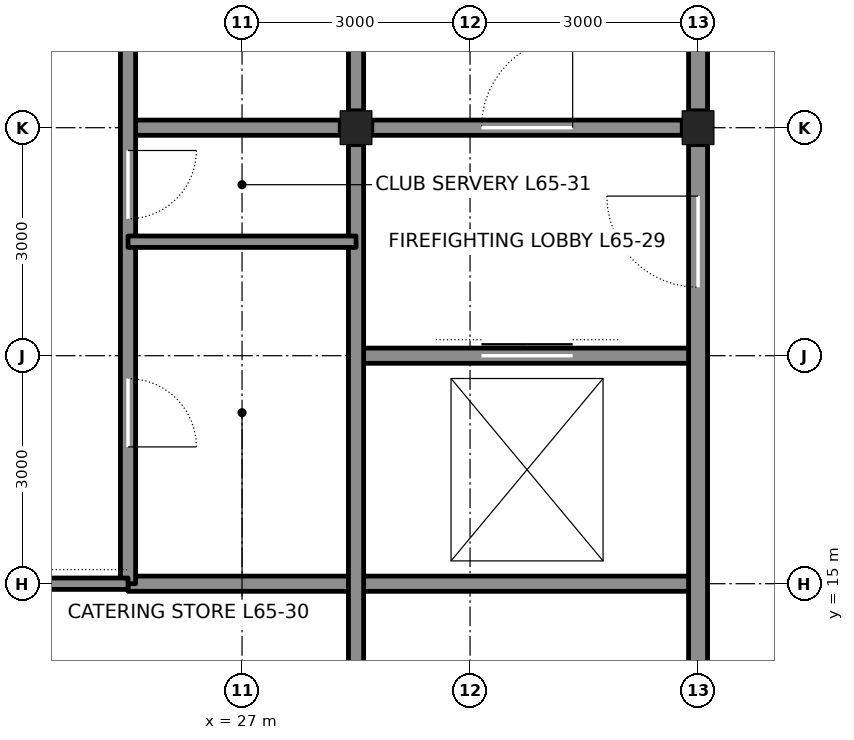
"""IFC4 building model, lengths in metres.
Left out: names, types, materials, properties, quantities, classifications, styles, units other than length and angle.
Written with IfcOpenShell. Run it as: python <this file> out.ifc"""

import sys

from ifc_helpers import new_model, si_unit, direction, frame, frame_2d, origin, origin_2d, place, context, subcontext, project, spatial, rectangle, i_section, extrude, element, fill, save


model = new_model("IFC4")
c1 = context("Model", 3, precision=1e-05, world=origin(), true_north=direction((0.0, 1.0)))
c2 = subcontext(c1, "Body", "Model", "MODEL_VIEW")
j1 = project(units=[si_unit("LENGTHUNIT", "METRE"), si_unit("PLANEANGLEUNIT", "RADIAN")], contexts=[c1])
p1 = place(None, origin())
s1 = spatial("IfcSite", under=j1, at=p1, CompositionType="ELEMENT")
p2 = place(p1, origin())
s2 = spatial("IfcBuilding", under=s1, at=p2, CompositionType="ELEMENT")
p3 = place(p2, frame((0.0, 0.0, 291.6)))
s3 = spatial("IfcBuildingStorey", under=s2, at=p3, CompositionType="ELEMENT", Elevation=291.6)
for number, where, z_axis, x_axis in (
    (1, (33.0, 21.0, 0.0), (0.0, 0.0, 1.0), (1.0, 0.0, 0.0)),
    (2, (28.5, 21.0, 0.0), (0.0, 0.0, 1.0), (1.0, 0.0, 0.0)),
):
    element("IfcColumn", number, at=place(p3, frame(where, z_axis=z_axis, x_axis=x_axis)), inside=s3, PredefinedType="COLUMN", context=c2, shape_type="SweptSolid", body=[
        extrude(i_section(OverallWidth=0.417, OverallDepth=0.445, WebThickness=0.039, FlangeThickness=0.063, at=origin_2d()), origin(), (0.0, 0.0, 1.0), 4.2),
    ])
p4 = place(p3, frame((25.5, 15.0, 0.0), z_axis=(0.0, 0.0, 1.0), x_axis=(1.0, 0.0, 0.0)))
e3 = element("IfcWall", 3, at=p4, inside=s3, PredefinedType="SOLIDWALL", context=c2, shape_type="SweptSolid", body=[
    extrude(rectangle(XDim=7.5, YDim=0.2, at=frame_2d((3.75, 0.0))), origin(), (0.0, 0.0, 1.0), 4.04),
])
p5 = place(p3, frame((28.5, 18.0, 0.0), z_axis=(0.0, 0.0, 1.0), x_axis=(1.0, 0.0, 0.0)))
e4 = element("IfcWall", 4, at=p5, inside=s3, PredefinedType="SOLIDWALL", context=c2, shape_type="SweptSolid", body=[
    extrude(rectangle(XDim=4.5, YDim=0.2, at=frame_2d((2.25, 0.0))), origin(), (0.0, 0.0, 1.0), 4.04),
])
p6 = place(p5, frame((1.65, 0.0, 0.0)))
e5 = element("IfcOpeningElement", 5, at=p6, cuts=e4, PredefinedType="OPENING", context=c2, shape_type="SweptSolid", body=[
    extrude(rectangle(XDim=1.2, YDim=2.1, at=frame_2d((0.6, 1.05))), frame((0.0, 0.11, 0.0), z_axis=(0.0, -1.0, 0.0), x_axis=(1.0, 0.0, 0.0)), (0.0, 0.0, 1.0), 0.22),
])
p7 = place(p3, frame((25.5, 21.0, 0.0), z_axis=(0.0, 0.0, 1.0), x_axis=(1.0, 0.0, 0.0)))
e6 = element("IfcWall", 6, at=p7, inside=s3, PredefinedType="SOLIDWALL", context=c2, shape_type="SweptSolid", body=[
    extrude(rectangle(XDim=2.792, YDim=0.2, at=frame_2d((1.396, 0.0))), origin(), (0.0, 0.0, 1.0), 3.09),
])
p8 = place(p3, frame((28.708, 21.0, 0.0), z_axis=(0.0, 0.0, 1.0), x_axis=(1.0, 0.0, 0.0)))
e7 = element("IfcWall", 7, at=p8, inside=s3, PredefinedType="SOLIDWALL", context=c2, shape_type="SweptSolid", body=[
    extrude(rectangle(XDim=4.083, YDim=0.2, at=frame_2d((2.042, 0.0))), origin(), (0.0, 0.0, 1.0), 3.09),
])
p9 = place(p8, frame((1.442, 0.0, 0.0)))
e8 = element("IfcOpeningElement", 8, at=p9, cuts=e7, PredefinedType="OPENING", context=c2, shape_type="SweptSolid", body=[
    extrude(rectangle(XDim=1.2, YDim=2.1, at=frame_2d((0.6, 1.05))), frame((0.0, 0.11, 0.0), z_axis=(0.0, -1.0, 0.0), x_axis=(1.0, 0.0, 0.0)), (0.0, 0.0, 1.0), 0.22),
])
p10 = place(p3, frame((25.5, 15.0, 0.0), z_axis=(0.0, 0.0, 1.0), x_axis=(0.0, 1.0, 0.0)))
e9 = element("IfcWall", 9, at=p10, inside=s3, PredefinedType="SOLIDWALL", context=c2, shape_type="SweptSolid", body=[
    extrude(rectangle(XDim=12.0, YDim=0.2, at=frame_2d((6.0, 0.0))), origin(), (0.0, 0.0, 1.0), 3.064),
])
p11 = place(p10, frame((1.8, 0.0, 0.0)))
e10 = element("IfcOpeningElement", 10, at=p11, cuts=e9, PredefinedType="OPENING", context=c2, shape_type="SweptSolid", body=[
    extrude(rectangle(XDim=0.9, YDim=2.1, at=frame_2d((0.45, 1.05))), frame((0.0, 0.11, 0.0), z_axis=(0.0, -1.0, 0.0), x_axis=(1.0, 0.0, 0.0)), (0.0, 0.0, 1.0), 0.22),
])
p12 = place(p10, frame((4.8, 0.0, 0.0)))
e11 = element("IfcOpeningElement", 11, at=p12, cuts=e9, PredefinedType="OPENING", context=c2, shape_type="SweptSolid", body=[
    extrude(rectangle(XDim=0.9, YDim=2.1, at=frame_2d((0.45, 1.05))), frame((0.0, 0.11, 0.0), z_axis=(0.0, -1.0, 0.0), x_axis=(1.0, 0.0, 0.0)), (0.0, 0.0, 1.0), 0.22),
])
p13 = place(p3, frame((28.5, 12.222, 0.0), z_axis=(0.0, 0.0, 1.0), x_axis=(0.0, 1.0, 0.0)))
e12 = element("IfcWall", 12, at=p13, inside=s3, PredefinedType="SOLIDWALL", context=c2, shape_type="SweptSolid", body=[
    extrude(rectangle(XDim=8.555, YDim=0.2, at=frame_2d((4.278, 0.0))), origin(), (0.0, 0.0, 1.0), 3.113),
])
p14 = place(p3, frame((28.5, 21.222, 0.0), z_axis=(0.0, 0.0, 1.0), x_axis=(0.0, 1.0, 0.0)))
e13 = element("IfcWall", 13, at=p14, inside=s3, PredefinedType="SOLIDWALL", context=c2, shape_type="SweptSolid", body=[
    extrude(rectangle(XDim=2.555, YDim=0.2, at=frame_2d((1.278, 0.0))), origin(), (0.0, 0.0, 1.0), 3.113),
])
p15 = place(p3, frame((33.0, 12.25, 0.0), z_axis=(0.0, 0.0, 1.0), x_axis=(0.0, 1.0, 0.0)))
e14 = element("IfcWall", 14, at=p15, inside=s3, PredefinedType="SOLIDWALL", context=c2, shape_type="SweptSolid", body=[
    extrude(rectangle(XDim=8.528, YDim=0.25, at=frame_2d((4.264, 0.0))), origin(), (0.0, 0.0, 1.0), 3.113),
])
p16 = place(p15, frame((6.65, 0.0, 0.0)))
e15 = element("IfcOpeningElement", 15, at=p16, cuts=e14, PredefinedType="OPENING", context=c2, shape_type="SweptSolid", body=[
    extrude(rectangle(XDim=1.2, YDim=2.1, at=frame_2d((0.6, 1.05))), frame((0.0, 0.135, 0.0), z_axis=(0.0, -1.0, 0.0), x_axis=(1.0, 0.0, 0.0)), (0.0, 0.0, 1.0), 0.27),
])
p17 = place(p15, frame((0.875, 0.0, 0.0)))
e16 = element("IfcOpeningElement", 16, at=p17, cuts=e14, PredefinedType="OPENING", context=c2, shape_type="SweptSolid", body=[
    extrude(rectangle(XDim=0.75, YDim=2.1, at=frame_2d((0.375, 1.05))), frame((0.0, 0.135, 0.0), z_axis=(0.0, -1.0, 0.0), x_axis=(1.0, 0.0, 0.0)), (0.0, 0.0, 1.0), 0.27),
])
p18 = place(p3, frame((33.0, 21.222, 0.0), z_axis=(0.0, 0.0, 1.0), x_axis=(0.0, 1.0, 0.0)))
e17 = element("IfcWall", 17, at=p18, inside=s3, PredefinedType="SOLIDWALL", context=c2, shape_type="SweptSolid", body=[
    extrude(rectangle(XDim=2.555, YDim=0.25, at=frame_2d((1.278, 0.0))), origin(), (0.0, 0.0, 1.0), 3.113),
])
p19 = place(p3, frame((19.5, 15.0, 0.0), z_axis=(0.0, 0.0, 1.0), x_axis=(1.0, 0.0, 0.0)))
e18 = element("IfcWall", 18, at=p19, inside=s3, PredefinedType="PARTITIONING", context=c2, shape_type="SweptSolid", body=[
    extrude(rectangle(XDim=6.0, YDim=0.15, at=frame_2d((3.0, 0.0))), origin(), (0.0, 0.0, 1.0), 4.04),
])
p20 = place(p19, frame((4.0, 0.0, 0.0)))
e19 = element("IfcOpeningElement", 19, at=p20, cuts=e18, PredefinedType="OPENING", context=c2, shape_type="SweptSolid", body=[
    extrude(rectangle(XDim=1.0, YDim=2.1, at=frame_2d((0.5, 1.05))), frame((0.0, 0.085, 0.0), z_axis=(0.0, -1.0, 0.0), x_axis=(1.0, 0.0, 0.0)), (0.0, 0.0, 1.0), 0.17),
])
p21 = place(p19, frame((1.05, 0.0, 0.0)))
e20 = element("IfcOpeningElement", 20, at=p21, cuts=e18, PredefinedType="OPENING", context=c2, shape_type="SweptSolid", body=[
    extrude(rectangle(XDim=0.9, YDim=2.1, at=frame_2d((0.45, 1.05))), frame((0.0, 0.085, 0.0), z_axis=(0.0, -1.0, 0.0), x_axis=(1.0, 0.0, 0.0)), (0.0, 0.0, 1.0), 0.17),
])
p22 = place(p3, frame((25.5, 19.5, 0.0), z_axis=(0.0, 0.0, 1.0), x_axis=(1.0, 0.0, 0.0)))
e21 = element("IfcWall", 21, at=p22, inside=s3, PredefinedType="PARTITIONING", context=c2, shape_type="SweptSolid", body=[
    extrude(rectangle(XDim=3.0, YDim=0.15, at=frame_2d((1.5, 0.0))), origin(), (0.0, 0.0, 1.0), 4.04),
])
p23 = place(p9, origin())
e22 = element("IfcDoor", 22, at=p23, inside=s3, OperationType="SINGLE_SWING_RIGHT", PredefinedType="DOOR", context=c2, shape_type="SweptSolid", body=[
    extrude(rectangle(XDim=1.2, YDim=2.1, at=frame_2d((0.6, 1.05))), frame((0.0, 0.025, 0.0), z_axis=(0.0, -1.0, 0.0), x_axis=(1.0, 0.0, 0.0)), (0.0, 0.0, 1.0), 0.05),
])
fill(e8, e22)
p24 = place(p16, origin())
e23 = element("IfcDoor", 23, at=p24, inside=s3, OperationType="SINGLE_SWING_RIGHT", PredefinedType="DOOR", context=c2, shape_type="SweptSolid", body=[
    extrude(rectangle(XDim=1.2, YDim=2.1, at=frame_2d((0.6, 1.05))), frame((0.0, 0.025, 0.0), z_axis=(0.0, -1.0, 0.0), x_axis=(1.0, 0.0, 0.0)), (0.0, 0.0, 1.0), 0.05),
])
fill(e15, e23)
p25 = place(p6, origin())
e24 = element("IfcDoor", 24, at=p25, inside=s3, OperationType="DOUBLE_DOOR_SLIDING", PredefinedType="DOOR", context=c2, shape_type="SweptSolid", body=[
    extrude(rectangle(XDim=1.2, YDim=2.1, at=frame_2d((0.6, 1.05))), frame((0.0, 0.025, 0.0), z_axis=(0.0, -1.0, 0.0), x_axis=(1.0, 0.0, 0.0)), (0.0, 0.0, 1.0), 0.05),
])
fill(e5, e24)
p26 = place(p11, frame((0.9, 0.0, 0.0), z_axis=(0.0, 0.0, 1.0), x_axis=(-1.0, 0.0, 0.0)))
e25 = element("IfcDoor", 25, at=p26, inside=s3, OperationType="SINGLE_SWING_RIGHT", PredefinedType="DOOR", context=c2, shape_type="SweptSolid", body=[
    extrude(rectangle(XDim=0.9, YDim=2.1, at=frame_2d((0.45, 1.05))), frame((0.0, 0.025, 0.0), z_axis=(0.0, -1.0, 0.0), x_axis=(1.0, 0.0, 0.0)), (0.0, 0.0, 1.0), 0.05),
])
fill(e10, e25)
p27 = place(p12, frame((0.9, 0.0, 0.0), z_axis=(0.0, 0.0, 1.0), x_axis=(-1.0, 0.0, 0.0)))
e26 = element("IfcDoor", 26, at=p27, inside=s3, OperationType="SINGLE_SWING_LEFT", PredefinedType="DOOR", context=c2, shape_type="SweptSolid", body=[
    extrude(rectangle(XDim=0.9, YDim=2.1, at=frame_2d((0.45, 1.05))), frame((0.0, 0.025, 0.0), z_axis=(0.0, -1.0, 0.0), x_axis=(1.0, 0.0, 0.0)), (0.0, 0.0, 1.0), 0.05),
])
fill(e11, e26)
save(model, sys.argv[1])
